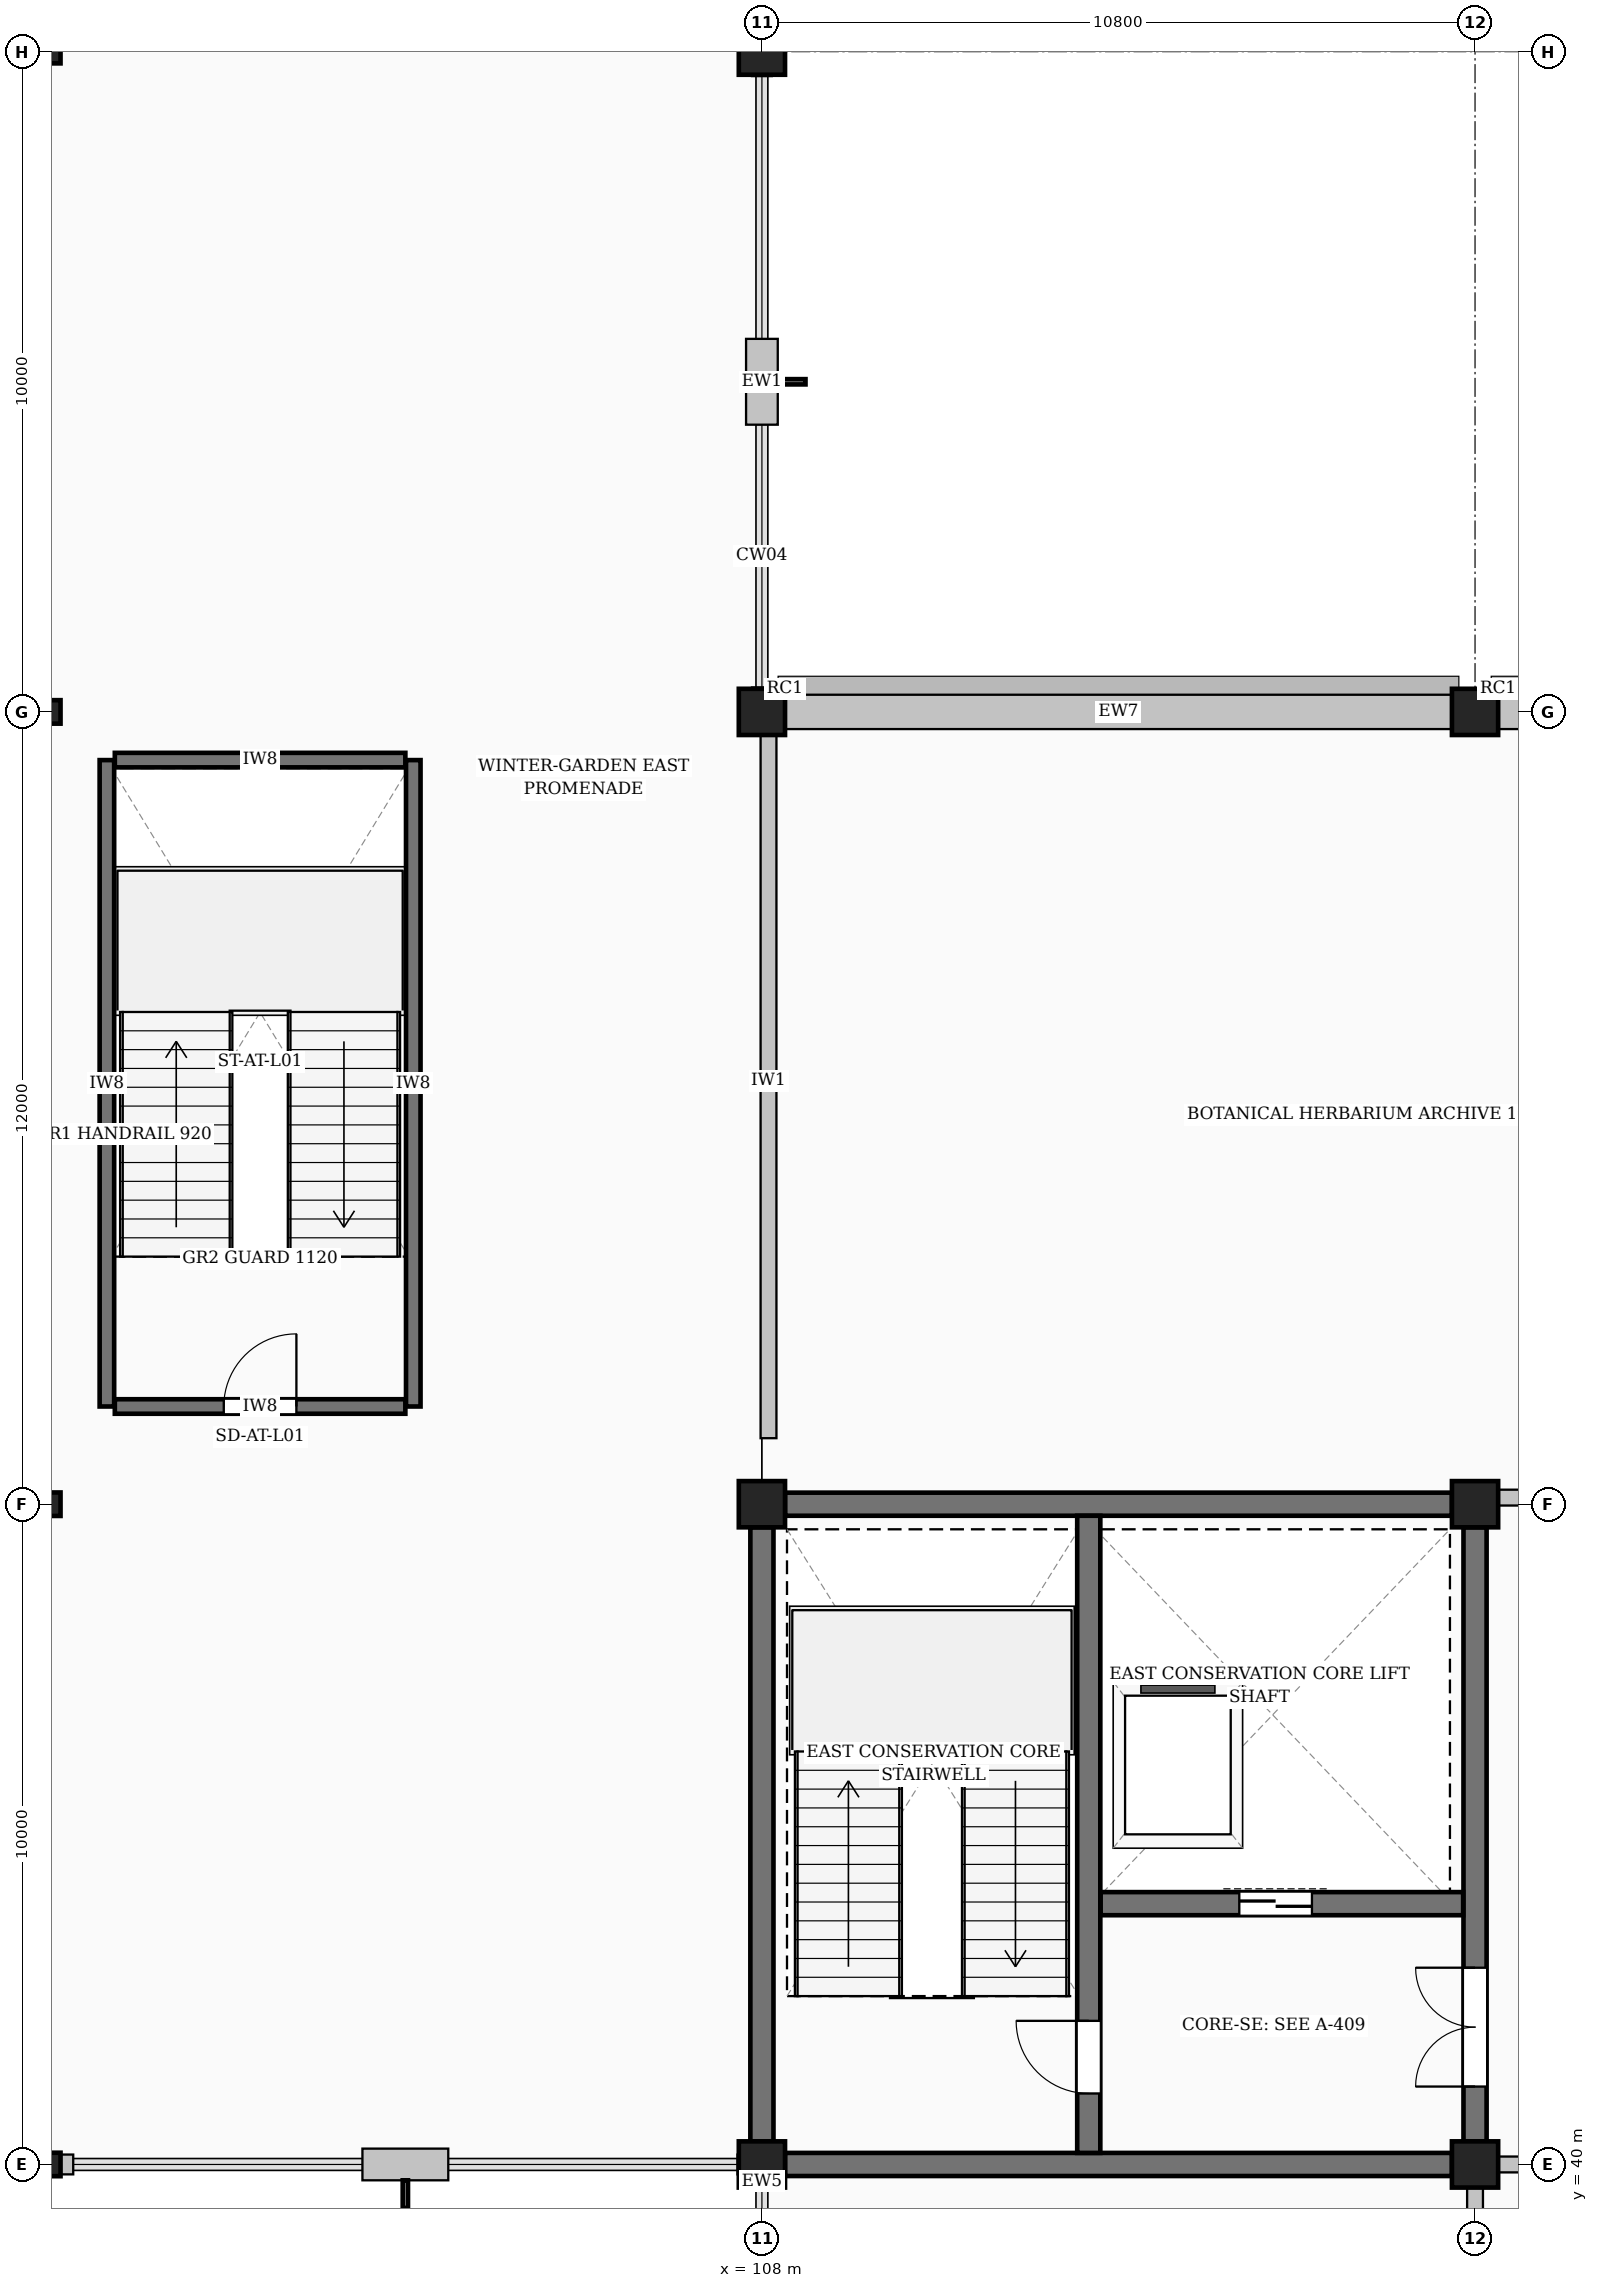
"""IFC4 building model, lengths in metres.
Left out: names, types, materials, properties, quantities, classifications, styles, units other than length and angle.
Written with IfcOpenShell. Run it as: python <this file> out.ifc"""

import sys

from ifc_helpers import new_model, si_unit, direction, frame, frame_2d, origin, origin_2d, place, context, subcontext, project, spatial, rectangle, hollow_circle, extrude, element, fill, save


model = new_model("IFC4")
c1 = context("Model", 3, precision=1e-05, world=origin(), true_north=direction((0.0, 1.0)))
c2 = subcontext(c1, "Body", "Model", "MODEL_VIEW")
j1 = project(units=[si_unit("LENGTHUNIT", "METRE"), si_unit("PLANEANGLEUNIT", "RADIAN")], contexts=[c1])
p1 = place(None, origin())
s1 = spatial("IfcSite", under=j1, at=p1, CompositionType="ELEMENT")
p2 = place(p1, origin())
s2 = spatial("IfcBuilding", under=s1, at=p2, CompositionType="ELEMENT")
p3 = place(p2, frame((0.0, 0.0, 4.8)))
s3 = spatial("IfcBuildingStorey", under=s2, at=p3, CompositionType="ELEMENT", Elevation=4.8)
for number, where, z_axis, x_axis in (
    (1, (97.2, 40.0, 0.0), (0.0, 0.0, 1.0), (1.0, 0.0, 0.0)),
    (2, (97.2, 50.0, 0.0), (0.0, 0.0, 1.0), (1.0, 0.0, 0.0)),
    (3, (97.2, 62.0, 0.0), (0.0, 0.0, 1.0), (1.0, 0.0, 0.0)),
    (4, (97.2, 72.0, 0.0), (0.0, 0.0, 1.0), (1.0, 0.0, 0.0)),
):
    element("IfcColumn", number, at=place(p3, frame(where, z_axis=z_axis, x_axis=x_axis)), inside=s3, PredefinedType="COLUMN", context=c2, shape_type="SweptSolid", body=[
        extrude(hollow_circle(Radius=0.178, WallThickness=0.016, at=origin_2d()), origin(), (0.0, 0.0, 1.0), 4.8),
    ])
for number, where, z_axis, x_axis in (
    (5, (108.0, 40.0, 0.0), (0.0, 0.0, 1.0), (1.0, 0.0, 0.0)),
    (6, (108.0, 50.0, 0.0), (0.0, 0.0, 1.0), (1.0, 0.0, 0.0)),
    (7, (108.0, 62.0, 0.0), (0.0, 0.0, 1.0), (1.0, 0.0, 0.0)),
    (8, (108.0, 72.0, 0.0), (0.0, 0.0, 1.0), (1.0, 0.0, 0.0)),
    (9, (118.8, 40.0, 0.0), (0.0, 0.0, 1.0), (1.0, 0.0, 0.0)),
    (10, (118.8, 50.0, 0.0), (0.0, 0.0, 1.0), (1.0, 0.0, 0.0)),
    (11, (118.8, 62.0, 0.0), (0.0, 0.0, 1.0), (1.0, 0.0, 0.0)),
):
    element("IfcColumn", number, at=place(p3, frame(where, z_axis=z_axis, x_axis=x_axis)), inside=s3, PredefinedType="COLUMN", context=c2, shape_type="SweptSolid", body=[
        extrude(rectangle(XDim=0.7, YDim=0.7, at=origin_2d()), origin(), (0.0, 0.0, 1.0), 4.8),
    ])
p4 = place(p3, frame((101.95, 40.0, 0.0), z_axis=(0.0, 0.0, 1.0), x_axis=(1.0, 0.0, 0.0)))
e12 = element("IfcWall", 12, at=p4, inside=s3, PredefinedType="STANDARD", context=c2, shape_type="SweptSolid", body=[
    extrude(rectangle(XDim=1.3, YDim=0.48, at=frame_2d((0.65, 0.0))), origin(), (0.0, 0.0, 1.0), 4.06),
])
for number, where, z_axis, x_axis in (
    (13, (97.345, 40.0, 0.0), (0.0, 0.0, 1.0), (1.0, 0.0, 0.0)),
    (14, (107.63, 40.0, 0.0), (0.0, 0.0, 1.0), (1.0, 0.0, 0.0)),
    (15, (108.0, 39.855, 0.0), (0.0, 0.0, 1.0), (0.0, -1.0, 0.0)),
):
    element("IfcWall", number, at=place(p3, frame(where, z_axis=z_axis, x_axis=x_axis)), inside=s3, PredefinedType="STANDARD", context=c2, shape_type="SweptSolid", body=[
        extrude(rectangle(XDim=0.225, YDim=0.3, at=frame_2d((0.113, 0.0))), origin(), (0.0, 0.0, 1.0), 4.56),
    ])
for number, where, z_axis, x_axis in (
    (16, (129.455, 62.0, 0.0), (0.0, 0.0, 1.0), (-1.0, 0.0, 0.0)),
    (17, (118.655, 62.0, 0.0), (0.0, 0.0, 1.0), (-1.0, 0.0, 0.0)),
):
    element("IfcWall", number, at=place(p3, frame(where, z_axis=z_axis, x_axis=x_axis)), inside=s3, PredefinedType="SOLIDWALL", context=c2, shape_type="SweptSolid", body=[
        extrude(rectangle(XDim=10.51, YDim=0.52, at=frame_2d((5.255, 0.0))), origin(), (0.0, 0.0, 1.0), 3.83),
    ])
p5 = place(p3, frame((108.0, 66.35, 0.0), z_axis=(0.0, 0.0, 1.0), x_axis=(0.0, 1.0, 0.0)))
e18 = element("IfcWall", 18, at=p5, inside=s3, PredefinedType="STANDARD", context=c2, shape_type="SweptSolid", body=[
    extrude(rectangle(XDim=1.3, YDim=0.48, at=frame_2d((0.65, 0.0))), origin(), (0.0, 0.0, 1.0), 4.56),
])
for number, where, z_axis, x_axis in (
    (19, (108.0, 62.145, 0.0), (0.0, 0.0, 1.0), (0.0, 1.0, 0.0)),
    (20, (108.0, 71.63, 0.0), (0.0, 0.0, 1.0), (0.0, 1.0, 0.0)),
):
    element("IfcWall", number, at=place(p3, frame(where, z_axis=z_axis, x_axis=x_axis)), inside=s3, PredefinedType="STANDARD", context=c2, shape_type="SweptSolid", body=[
        extrude(rectangle(XDim=0.225, YDim=0.3, at=frame_2d((0.113, 0.0))), origin(), (0.0, 0.0, 1.0), 4.56),
    ])
for number, where, z_axis, x_axis in (
    (21, (108.35, 40.0, 0.0), (0.0, 0.0, 1.0), (1.0, 0.0, 0.0)),
    (22, (108.35, 50.0, 0.0), (0.0, 0.0, 1.0), (1.0, 0.0, 0.0)),
):
    element("IfcWall", number, at=place(p3, frame(where, z_axis=z_axis, x_axis=x_axis)), inside=s3, PredefinedType="SHEAR", context=c2, shape_type="SweptSolid", body=[
        extrude(rectangle(XDim=10.1, YDim=0.35, at=frame_2d((5.05, 0.0))), origin(), (0.0, 0.0, 1.0), 4.56),
    ])
p6 = place(p3, frame((108.0, 40.35, 0.0), z_axis=(0.0, 0.0, 1.0), x_axis=(0.0, 1.0, 0.0)))
e23 = element("IfcWall", 23, at=p6, inside=s3, PredefinedType="SHEAR", context=c2, shape_type="SweptSolid", body=[
    extrude(rectangle(XDim=9.3, YDim=0.35, at=frame_2d((4.65, 0.0))), origin(), (0.0, 0.0, 1.0), 4.56),
])
p7 = place(p3, frame((118.8, 40.35, 0.0), z_axis=(0.0, 0.0, 1.0), x_axis=(0.0, 1.0, 0.0)))
e24 = element("IfcWall", 24, at=p7, inside=s3, PredefinedType="SHEAR", context=c2, shape_type="SweptSolid", body=[
    extrude(rectangle(XDim=9.3, YDim=0.35, at=frame_2d((4.65, 0.0))), origin(), (0.0, 0.0, 1.0), 4.56),
])
p8 = place(p7, frame((0.83, 0.0, 0.0)))
e25 = element("IfcOpeningElement", 25, at=p8, cuts=e24, PredefinedType="OPENING", context=c2, shape_type="SweptSolid", body=[
    extrude(rectangle(XDim=1.8, YDim=2.25, at=frame_2d((0.9, 1.125))), frame((0.0, 0.185, 0.0), z_axis=(0.0, -1.0, 0.0), x_axis=(1.0, 0.0, 0.0)), (0.0, 0.0, 1.0), 0.37),
])
p9 = place(p3, frame((112.95, 40.175, 0.0), z_axis=(0.0, 0.0, 1.0), x_axis=(0.0, 1.0, 0.0)))
e26 = element("IfcWall", 26, at=p9, inside=s3, PredefinedType="SHEAR", context=c2, shape_type="SweptSolid", body=[
    extrude(rectangle(XDim=9.65, YDim=0.35, at=frame_2d((4.825, 0.0))), origin(), (0.0, 0.0, 1.0), 4.56),
])
p10 = place(p9, frame((0.9, 0.0, 0.0)))
e27 = element("IfcOpeningElement", 27, at=p10, cuts=e26, PredefinedType="OPENING", context=c2, shape_type="SweptSolid", body=[
    extrude(rectangle(XDim=1.1, YDim=2.2, at=frame_2d((0.55, 1.1))), frame((0.0, 0.185, 0.0), z_axis=(0.0, -1.0, 0.0), x_axis=(1.0, 0.0, 0.0)), (0.0, 0.0, 1.0), 0.37),
])
p11 = place(p3, frame((113.13, 43.95, 0.0), z_axis=(0.0, 0.0, 1.0), x_axis=(1.0, 0.0, 0.0)))
e28 = element("IfcWall", 28, at=p11, inside=s3, PredefinedType="SHEAR", context=c2, shape_type="SweptSolid", body=[
    extrude(rectangle(XDim=5.49, YDim=0.35, at=frame_2d((2.745, 0.0))), origin(), (0.0, 0.0, 1.0), 4.56),
])
p12 = place(p11, frame((2.1, 0.0, 0.0)))
e29 = element("IfcOpeningElement", 29, at=p12, cuts=e28, PredefinedType="OPENING", context=c2, shape_type="SweptSolid", body=[
    extrude(rectangle(XDim=1.1, YDim=2.2, at=frame_2d((0.55, 1.1))), frame((0.0, 0.185, 0.0), z_axis=(0.0, -1.0, 0.0), x_axis=(1.0, 0.0, 0.0)), (0.0, 0.0, 1.0), 0.37),
])
for number, where, z_axis, x_axis in (
    (30, (98.08, 51.48, 0.0), (0.0, 0.0, 1.0), (0.0, 1.0, 0.0)),
    (31, (102.72, 51.48, 0.0), (0.0, 0.0, 1.0), (0.0, 1.0, 0.0)),
):
    element("IfcWall", number, at=place(p3, frame(where, z_axis=z_axis, x_axis=x_axis)), inside=s3, PredefinedType="SHEAR", context=c2, shape_type="SweptSolid", body=[
        extrude(rectangle(XDim=9.79, YDim=0.22, at=frame_2d((4.895, 0.0))), origin(), (0.0, 0.0, 1.0), 4.56),
    ])
p13 = place(p3, frame((98.2, 61.27, 0.0), z_axis=(0.0, 0.0, 1.0), x_axis=(1.0, 0.0, 0.0)))
e32 = element("IfcWall", 32, at=p13, inside=s3, PredefinedType="SHEAR", context=c2, shape_type="SweptSolid", body=[
    extrude(rectangle(XDim=4.4, YDim=0.22, at=frame_2d((2.2, 0.0))), origin(), (0.0, 0.0, 1.0), 4.56),
])
p14 = place(p3, frame((98.2, 51.48, 0.0), z_axis=(0.0, 0.0, 1.0), x_axis=(1.0, 0.0, 0.0)))
e33 = element("IfcWall", 33, at=p14, inside=s3, PredefinedType="SHEAR", context=c2, shape_type="SweptSolid", body=[
    extrude(rectangle(XDim=4.4, YDim=0.22, at=frame_2d((2.2, 0.0))), origin(), (0.0, 0.0, 1.0), 4.56),
])
p15 = place(p14, frame((1.65, 0.0, 0.0)))
e34 = element("IfcOpeningElement", 34, at=p15, cuts=e33, PredefinedType="OPENING", context=c2, shape_type="SweptSolid", body=[
    extrude(rectangle(XDim=1.1, YDim=2.2, at=frame_2d((0.55, 1.1))), frame((0.0, 0.12, 0.0), z_axis=(0.0, -1.0, 0.0), x_axis=(1.0, 0.0, 0.0)), (0.0, 0.0, 1.0), 0.24),
])
p16 = place(p3, frame((118.98, 40.0, 0.0), z_axis=(0.0, 0.0, 1.0), x_axis=(1.0, 0.0, 0.0)))
e35 = element("IfcWall", 35, at=p16, inside=s3, PredefinedType="SOLIDWALL", context=c2, shape_type="SweptSolid", body=[
    extrude(rectangle(XDim=10.42, YDim=0.24, at=frame_2d((5.21, 0.0))), origin(), (0.0, 0.0, 1.0), 3.83),
])
p17 = place(p3, frame((118.98, 50.1, 0.0), z_axis=(0.0, 0.0, 1.0), x_axis=(1.0, 0.0, 0.0)))
e36 = element("IfcWall", 36, at=p17, inside=s3, PredefinedType="SOLIDWALL", context=c2, shape_type="SweptSolid", body=[
    extrude(rectangle(XDim=6.82, YDim=0.24, at=frame_2d((3.41, 0.0))), origin(), (0.0, 0.0, 1.0), 3.83),
])
p18 = place(p17, frame((2.66, 0.0, 0.0)))
e37 = element("IfcOpeningElement", 37, at=p18, cuts=e36, PredefinedType="OPENING", context=c2, shape_type="SweptSolid", body=[
    extrude(rectangle(XDim=1.5, YDim=2.4, at=frame_2d((0.75, 1.2))), frame((0.0, 0.13, 0.0), z_axis=(0.0, -1.0, 0.0), x_axis=(1.0, 0.0, 0.0)), (0.0, 0.0, 1.0), 0.26),
])
p19 = place(p3, frame((118.8, 30.2, 0.0), z_axis=(0.0, 0.0, 1.0), x_axis=(0.0, 1.0, 0.0)))
e38 = element("IfcWall", 38, at=p19, inside=s3, PredefinedType="SOLIDWALL", context=c2, shape_type="SweptSolid", body=[
    extrude(rectangle(XDim=9.62, YDim=0.24, at=frame_2d((4.81, 0.0))), origin(), (0.0, 0.0, 1.0), 3.969),
])
p20 = place(p19, frame((4.07, 0.0, 0.0)))
e39 = element("IfcOpeningElement", 39, at=p20, cuts=e38, PredefinedType="OPENING", context=c2, shape_type="SweptSolid", body=[
    extrude(rectangle(XDim=1.48, YDim=2.42, at=frame_2d((0.74, 1.21))), frame((0.0, 0.13, 0.0), z_axis=(0.0, -1.0, 0.0), x_axis=(1.0, 0.0, 0.0)), (0.0, 0.0, 1.0), 0.26),
])
p21 = place(p3, frame((108.1, 51.0, 0.0), z_axis=(0.0, 0.0, 1.0), x_axis=(0.0, 1.0, 0.0)))
e40 = element("IfcWall", 40, at=p21, inside=s3, PredefinedType="SOLIDWALL", context=c2, shape_type="SweptSolid", body=[
    extrude(rectangle(XDim=10.82, YDim=0.24, at=frame_2d((5.41, 0.0))), origin(), (0.0, 0.0, 1.0), 3.919),
])
p22 = place(p10, origin())
e41 = element("IfcDoor", 41, at=p22, inside=s3, OperationType="SINGLE_SWING_RIGHT", PredefinedType="DOOR", context=c2, shape_type="SweptSolid", body=[
    extrude(rectangle(XDim=1.1, YDim=2.2, at=frame_2d((0.55, 1.1))), frame((0.0, 0.025, 0.0), z_axis=(0.0, -1.0, 0.0), x_axis=(1.0, 0.0, 0.0)), (0.0, 0.0, 1.0), 0.05),
])
fill(e27, e41)
p23 = place(p8, origin())
e42 = element("IfcDoor", 42, at=p23, inside=s3, OperationType="DOUBLE_DOOR_SINGLE_SWING", PredefinedType="DOOR", context=c2, shape_type="SweptSolid", body=[
    extrude(rectangle(XDim=1.8, YDim=2.25, at=frame_2d((0.9, 1.125))), frame((0.0, 0.025, 0.0), z_axis=(0.0, -1.0, 0.0), x_axis=(1.0, 0.0, 0.0)), (0.0, 0.0, 1.0), 0.05),
])
fill(e25, e42)
p24 = place(p12, origin())
e43 = element("IfcDoor", 43, at=p24, inside=s3, OperationType="DOUBLE_DOOR_SLIDING", PredefinedType="DOOR", context=c2, shape_type="SweptSolid", body=[
    extrude(rectangle(XDim=1.1, YDim=2.2, at=frame_2d((0.55, 1.1))), frame((0.0, 0.025, 0.0), z_axis=(0.0, -1.0, 0.0), x_axis=(1.0, 0.0, 0.0)), (0.0, 0.0, 1.0), 0.05),
])
fill(e29, e43)
p25 = place(p15, origin())
e44 = element("IfcDoor", 44, at=p25, inside=s3, OperationType="SINGLE_SWING_RIGHT", PredefinedType="DOOR", context=c2, shape_type="SweptSolid", body=[
    extrude(rectangle(XDim=1.1, YDim=2.2, at=frame_2d((0.55, 1.1))), frame((0.0, 0.025, 0.0), z_axis=(0.0, -1.0, 0.0), x_axis=(1.0, 0.0, 0.0)), (0.0, 0.0, 1.0), 0.05),
])
fill(e34, e44)
save(model, sys.argv[1])
